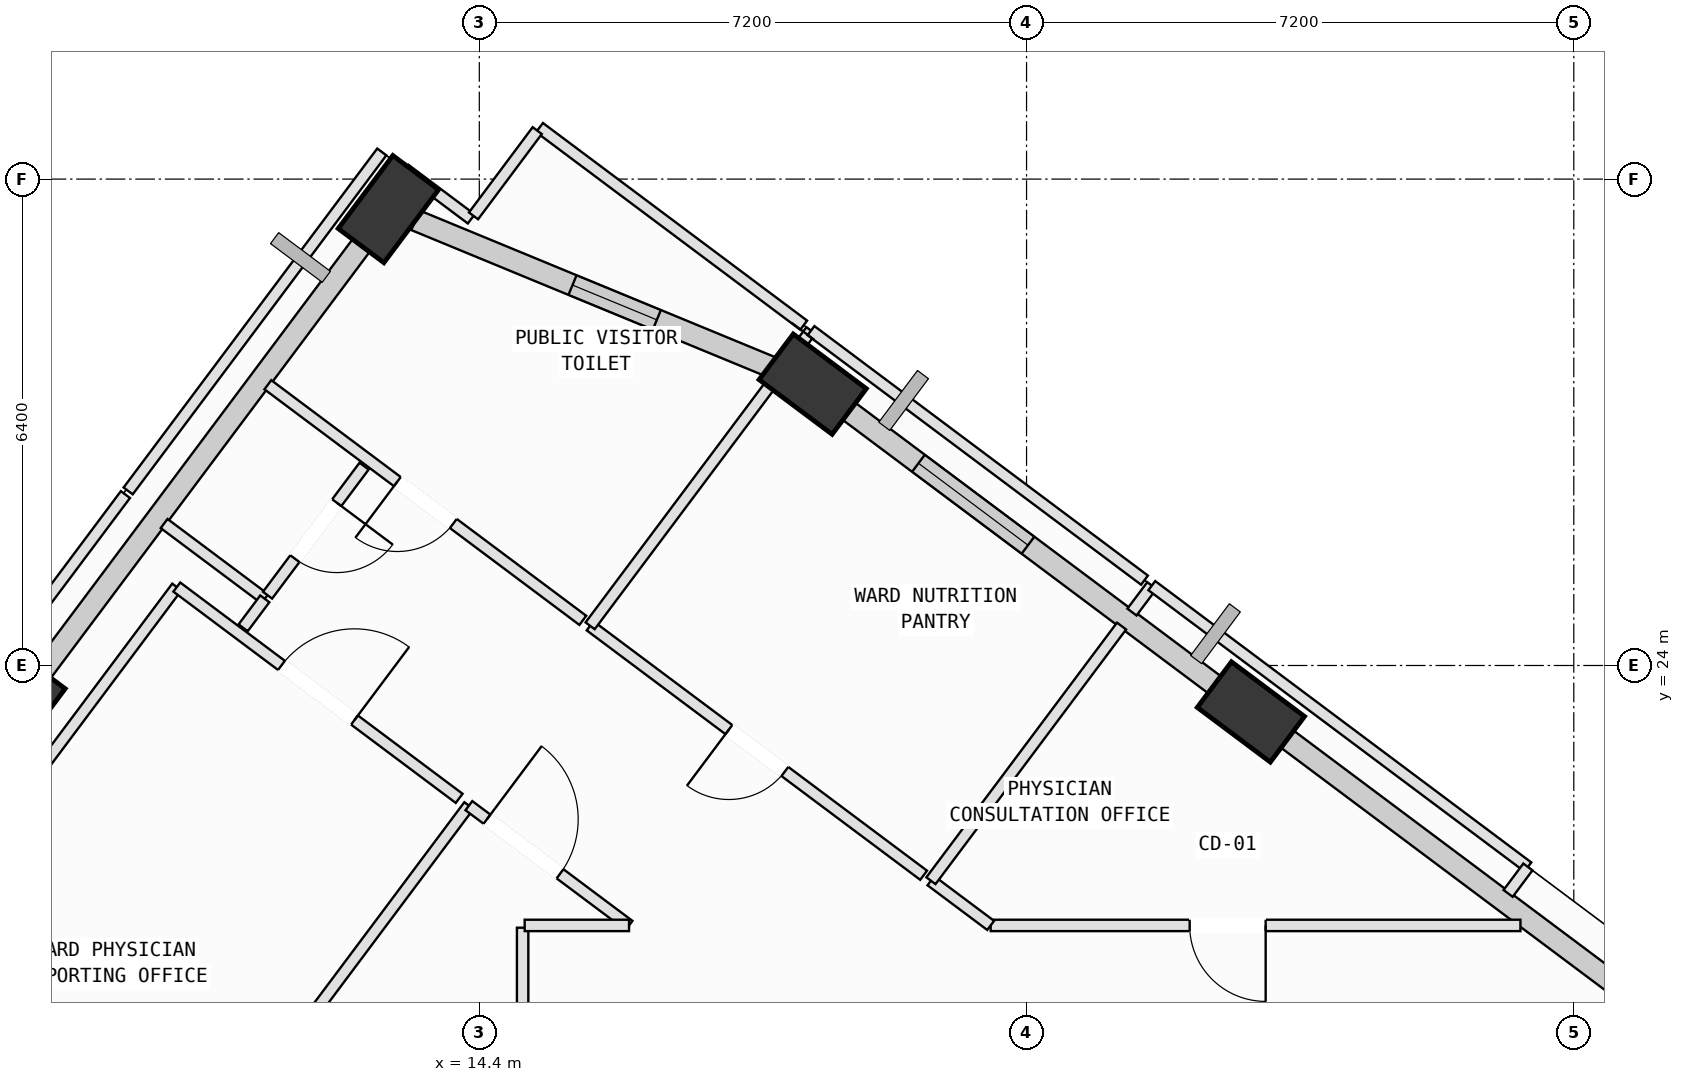
"""IFC4 building model, lengths in metres.
Left out: names, types, materials, properties, quantities, classifications, styles, units other than length and angle.
Written with IfcOpenShell. Run it as: python <this file> out.ifc"""

import sys

from ifc_helpers import new_model, si_unit, direction, frame, frame_2d, origin, origin_2d, place, context, subcontext, project, spatial, rectangle, extrude, element, fill, save


model = new_model("IFC4")
c1 = context("Model", 3, precision=1e-05, world=origin(), true_north=direction((0.0, 1.0)))
c2 = subcontext(c1, "Body", "Model", "MODEL_VIEW")
j1 = project(units=[si_unit("LENGTHUNIT", "METRE"), si_unit("PLANEANGLEUNIT", "RADIAN")], contexts=[c1])
p1 = place(None, origin())
s1 = spatial("IfcSite", under=j1, at=p1, CompositionType="ELEMENT")
p2 = place(p1, origin())
s2 = spatial("IfcBuilding", under=s1, at=p2, CompositionType="ELEMENT")
p3 = place(p2, frame((0.0, 0.0, 251.2)))
s3 = spatial("IfcBuildingStorey", under=s2, at=p3, CompositionType="ELEMENT", Elevation=251.2)
p4 = place(p3, frame((24.552, 23.389, 0.002), z_axis=(0.006165760518, -0.037421893045, 0.999280533843), x_axis=(-0.887393186709, 0.46045324072, 0.022718831231)))
e1 = element("IfcColumn", 1, at=p4, inside=s3, PredefinedType="COLUMN", context=c2, shape_type="SweptSolid", body=[
    extrude(rectangle(XDim=1.2, YDim=0.75, at=origin_2d()), origin(), (0.0, 0.0, 1.0), 3.999),
])
p5 = place(p3, frame((18.786, 27.702, 0.002), z_axis=(-0.011462699644, -0.061398609264, 0.998047502525), x_axis=(-0.677411868059, 0.734651823972, 0.037414683581)))
e2 = element("IfcColumn", 2, at=p5, inside=s3, PredefinedType="COLUMN", context=c2, shape_type="SweptSolid", body=[
    extrude(rectangle(XDim=1.2, YDim=0.75, at=origin_2d()), origin(), (0.0, 0.0, 1.0), 4.004),
])
p6 = place(p3, frame((13.204, 30.005, 0.002), z_axis=(-0.020814146338, -0.084352066736, 0.996218600584), x_axis=(0.772683823254, 0.630967378027, 0.069569225579)))
e3 = element("IfcColumn", 3, at=p6, inside=s3, PredefinedType="COLUMN", context=c2, shape_type="SweptSolid", body=[
    extrude(rectangle(XDim=1.2, YDim=0.75, at=origin_2d()), origin(), (0.0, 0.0, 1.0), 4.011),
])
p7 = place(p3, frame((8.292, 23.439, 0.002), z_axis=(0.006440188343, -0.104318899858, 0.994523047046), x_axis=(0.548815872699, 0.831743378243, 0.083690445228)))
e4 = element("IfcColumn", 4, at=p7, inside=s3, PredefinedType="COLUMN", context=c2, shape_type="SweptSolid", body=[
    extrude(rectangle(XDim=1.2, YDim=0.75, at=origin_2d()), origin(), (0.0, 0.0, 1.0), 4.018),
])
p8 = place(p3, frame((24.911, 23.12, 0.0), z_axis=(0.0, 0.0, 1.0), x_axis=(0.800736238288, -0.599017092154, 0.0)))
e5 = element("IfcWall", 5, at=p8, inside=s3, PredefinedType="SOLIDWALL", context=c2, shape_type="SweptSolid", body=[
    extrude(rectangle(XDim=6.958, YDim=0.28, at=frame_2d((3.479, 0.0))), origin(), (0.0, 0.0, 1.0), 3.165),
])
p9 = place(p3, frame((19.136, 27.44, 0.0), z_axis=(0.0, 0.0, 1.0), x_axis=(0.800738185677, -0.599014488972, 0.0)))
e6 = element("IfcWall", 6, at=p9, inside=s3, PredefinedType="SOLIDWALL", context=c2, shape_type="SweptSolid", body=[
    extrude(rectangle(XDim=6.424, YDim=0.28, at=frame_2d((3.212, 0.0))), origin(), (0.0, 0.0, 1.0), 3.265),
])
p10 = place(p9, frame((1.301, 0.0, 0.75)))
e7 = element("IfcOpeningElement", 7, at=p10, cuts=e6, PredefinedType="OPENING", context=c2, shape_type="SweptSolid", body=[
    extrude(rectangle(XDim=1.8, YDim=2.05, at=frame_2d((0.9, 1.025))), frame((0.0, 0.15, 0.0), z_axis=(0.0, -1.0, 0.0), x_axis=(1.0, 0.0, 0.0)), (0.0, 0.0, 1.0), 0.3),
])
p11 = place(p3, frame((13.559, 29.859, 0.0), z_axis=(0.0, 0.0, 1.0), x_axis=(0.924418513739, -0.381379615943, 0.0)))
e8 = element("IfcWall", 8, at=p11, inside=s3, PredefinedType="SOLIDWALL", context=c2, shape_type="SweptSolid", body=[
    extrude(rectangle(XDim=5.302, YDim=0.28, at=frame_2d((2.651, 0.0))), origin(), (0.0, 0.0, 1.0), 3.265),
])
p12 = place(p11, frame((2.237, 0.0, 0.75)))
e9 = element("IfcOpeningElement", 9, at=p12, cuts=e8, PredefinedType="OPENING", context=c2, shape_type="SweptSolid", body=[
    extrude(rectangle(XDim=1.2, YDim=1.75, at=frame_2d((0.6, 0.875))), frame((0.0, 0.15, 0.0), z_axis=(0.0, -1.0, 0.0), x_axis=(1.0, 0.0, 0.0)), (0.0, 0.0, 1.0), 0.3),
])
p13 = place(p3, frame((8.419, 23.61, 0.0), z_axis=(0.0, 0.0, 1.0), x_axis=(0.599043256436, 0.800716664569, 0.0)))
e10 = element("IfcWall", 10, at=p13, inside=s3, PredefinedType="SOLIDWALL", context=c2, shape_type="SweptSolid", body=[
    extrude(rectangle(XDim=7.434, YDim=0.28, at=frame_2d((3.717, 0.0))), origin(), (0.0, 0.0, 1.0), 3.265),
])
p14 = place(p3, frame((14.97, 20.55, 0.0), z_axis=(0.0, 0.0, 1.0), x_axis=(0.0, -1.0, 0.0)))
e11 = element("IfcWall", 11, at=p14, inside=s3, PredefinedType="PARTITIONING", context=c2, shape_type="SweptSolid", body=[
    extrude(rectangle(XDim=2.32, YDim=0.15, at=frame_2d((1.16, 0.0))), origin(), (0.0, 0.0, 1.0), 3.78),
])
p15 = place(p3, frame((6.096, 11.238, 0.0), z_axis=(0.0, 0.0, 1.0), x_axis=(0.598991058124, 0.80075571324, 0.0)))
e12 = element("IfcWall", 12, at=p15, inside=s3, PredefinedType="PARTITIONING", context=c2, shape_type="SweptSolid", body=[
    extrude(rectangle(XDim=13.635, YDim=0.15, at=frame_2d((6.817, 0.0))), origin(), (0.0, 0.0, 1.0), 3.78),
])
p16 = place(p3, frame((14.263, 22.156, 0.0), z_axis=(0.0, 0.0, 1.0), x_axis=(0.800812047069, -0.598915741377, 0.0)))
e13 = element("IfcWall", 13, at=p16, inside=s3, PredefinedType="PARTITIONING", context=c2, shape_type="SweptSolid", body=[
    extrude(rectangle(XDim=2.631, YDim=0.15, at=frame_2d((1.316, 0.0))), origin(), (0.0, 0.0, 1.0), 3.78),
])
p17 = place(p16, frame((0.297, 0.0, 0.0)))
e14 = element("IfcOpeningElement", 14, at=p17, cuts=e13, PredefinedType="OPENING", context=c2, shape_type="SweptSolid", body=[
    extrude(rectangle(XDim=1.2, YDim=2.15, at=frame_2d((0.6, 1.075))), frame((0.0, 0.085, 0.0), z_axis=(0.0, -1.0, 0.0), x_axis=(1.0, 0.0, 0.0)), (0.0, 0.0, 1.0), 0.17),
])
p18 = place(p3, frame((16.37, 20.58, 0.0), z_axis=(0.0, 0.0, 1.0), x_axis=(-1.0, 0.0, 0.0)))
e15 = element("IfcWall", 15, at=p18, inside=s3, PredefinedType="PARTITIONING", context=c2, shape_type="SweptSolid", body=[
    extrude(rectangle(XDim=1.373, YDim=0.15, at=frame_2d((0.687, 0.0))), origin(), (0.0, 0.0, 1.0), 3.78),
])
p19 = place(p3, frame((3.748, 16.112, 0.0), z_axis=(0.0, 0.0, 1.0), x_axis=(0.598961482062, 0.800777836235, 0.0)))
e16 = element("IfcWall", 16, at=p19, inside=s3, PredefinedType="PARTITIONING", context=c2, shape_type="SweptSolid", body=[
    extrude(rectangle(XDim=11.139, YDim=0.15, at=frame_2d((5.57, 0.0))), origin(), (0.0, 0.0, 1.0), 3.265),
])
p20 = place(p3, frame((10.42, 25.032, 0.0), z_axis=(0.0, 0.0, 1.0), x_axis=(0.800649857495, -0.599132544345, 0.0)))
e17 = element("IfcWall", 17, at=p20, inside=s3, PredefinedType="PARTITIONING", context=c2, shape_type="SweptSolid", body=[
    extrude(rectangle(XDim=4.64, YDim=0.15, at=frame_2d((2.32, 0.0))), origin(), (0.0, 0.0, 1.0), 3.78),
])
p21 = place(p20, frame((1.72, 0.0, 0.0)))
e18 = element("IfcOpeningElement", 18, at=p21, cuts=e17, PredefinedType="OPENING", context=c2, shape_type="SweptSolid", body=[
    extrude(rectangle(XDim=1.2, YDim=2.15, at=frame_2d((0.6, 1.075))), frame((0.0, 0.085, 0.0), z_axis=(0.0, -1.0, 0.0), x_axis=(1.0, 0.0, 0.0)), (0.0, 0.0, 1.0), 0.17),
])
p22 = place(p3, frame((28.098, 20.58, 0.0), z_axis=(0.0, 0.0, 1.0), x_axis=(-1.0, 0.0, 0.0)))
e19 = element("IfcWall", 19, at=p22, inside=s3, PredefinedType="PARTITIONING", context=c2, shape_type="SweptSolid", body=[
    extrude(rectangle(XDim=6.97, YDim=0.15, at=frame_2d((3.485, 0.0))), origin(), (0.0, 0.0, 1.0), 3.415),
])
p23 = place(p22, frame((3.352, 0.0, 0.0)))
e20 = element("IfcOpeningElement", 20, at=p23, cuts=e19, PredefinedType="OPENING", context=c2, shape_type="SweptSolid", body=[
    extrude(rectangle(XDim=1.0, YDim=2.12, at=frame_2d((0.5, 1.06))), frame((0.0, 0.085, 0.0), z_axis=(0.0, -1.0, 0.0), x_axis=(1.0, 0.0, 0.0)), (0.0, 0.0, 1.0), 0.17),
])
p24 = place(p3, frame((21.128, 20.58, 0.0), z_axis=(0.0, 0.0, 1.0), x_axis=(-0.800745649284, 0.599004511797, 0.0)))
e21 = element("IfcWall", 21, at=p24, inside=s3, PredefinedType="PARTITIONING", context=c2, shape_type="SweptSolid", body=[
    extrude(rectangle(XDim=0.981, YDim=0.15, at=frame_2d((0.491, 0.0))), origin(), (0.0, 0.0, 1.0), 3.415),
])
p25 = place(p3, frame((20.342, 21.168, 0.0), z_axis=(0.0, 0.0, 1.0), x_axis=(0.599197113392, 0.800601535911, 0.0)))
e22 = element("IfcWall", 22, at=p25, inside=s3, PredefinedType="PARTITIONING", context=c2, shape_type="SweptSolid", body=[
    extrude(rectangle(XDim=4.186, YDim=0.15, at=frame_2d((2.093, 0.0))), origin(), (0.0, 0.0, 1.0), 3.78),
])
p26 = place(p3, frame((22.987, 24.703, 0.0), z_axis=(0.0, 0.0, 1.0), x_axis=(0.599820431531, 0.800134644868, 0.0)))
e23 = element("IfcWall", 23, at=p26, inside=s3, PredefinedType="PARTITIONING", context=c2, shape_type="SweptSolid", body=[
    extrude(rectangle(XDim=0.435, YDim=0.15, at=frame_2d((0.218, 0.0))), origin(), (0.0, 0.0, 1.0), 3.78),
])
p27 = place(p3, frame((23.248, 25.051, 0.0), z_axis=(0.0, 0.0, 1.0), x_axis=(0.800705846132, -0.599057716727, 0.0)))
e24 = element("IfcWall", 24, at=p27, inside=s3, PredefinedType="PARTITIONING", context=c2, shape_type="SweptSolid", body=[
    extrude(rectangle(XDim=6.179, YDim=0.15, at=frame_2d((3.09, 0.0))), origin(), (0.0, 0.0, 1.0), 3.78),
])
p28 = place(p3, frame((28.196, 21.349, 0.0), z_axis=(0.0, 0.0, 1.0), x_axis=(-0.598380616577, -0.801211980505, 0.0)))
e25 = element("IfcWall", 25, at=p28, inside=s3, PredefinedType="PARTITIONING", context=c2, shape_type="SweptSolid", body=[
    extrude(rectangle(XDim=0.435, YDim=0.15, at=frame_2d((0.217, 0.0))), origin(), (0.0, 0.0, 1.0), 3.78),
])
p29 = place(p3, frame((20.246, 21.24, 0.0), z_axis=(0.0, 0.0, 1.0), x_axis=(-0.800801245032, 0.598930184542, 0.0)))
e26 = element("IfcWall", 26, at=p29, inside=s3, PredefinedType="PARTITIONING", context=c2, shape_type="SweptSolid", body=[
    extrude(rectangle(XDim=5.48, YDim=0.15, at=frame_2d((2.74, 0.0))), origin(), (0.0, 0.0, 1.0), 3.415),
])
p30 = place(p29, frame((2.28, 0.0, 0.0)))
e27 = element("IfcOpeningElement", 27, at=p30, cuts=e26, PredefinedType="OPENING", context=c2, shape_type="SweptSolid", body=[
    extrude(rectangle(XDim=0.92, YDim=2.1, at=frame_2d((0.46, 1.05))), frame((0.0, 0.085, 0.0), z_axis=(0.0, -1.0, 0.0), x_axis=(1.0, 0.0, 0.0)), (0.0, 0.0, 1.0), 0.17),
])
p31 = place(p3, frame((15.858, 24.522, 0.0), z_axis=(0.0, 0.0, 1.0), x_axis=(0.599126091741, 0.800654685989, 0.0)))
e28 = element("IfcWall", 28, at=p31, inside=s3, PredefinedType="PARTITIONING", context=c2, shape_type="SweptSolid", body=[
    extrude(rectangle(XDim=4.069, YDim=0.15, at=frame_2d((2.035, 0.0))), origin(), (0.0, 0.0, 1.0), 3.78),
])
p32 = place(p3, frame((18.438, 27.97, 0.0), z_axis=(0.0, 0.0, 1.0), x_axis=(0.598707624048, 0.800967652847, 0.0)))
e29 = element("IfcWall", 29, at=p32, inside=s3, PredefinedType="PARTITIONING", context=c2, shape_type="SweptSolid", body=[
    extrude(rectangle(XDim=0.544, YDim=0.15, at=frame_2d((0.272, 0.0))), origin(), (0.0, 0.0, 1.0), 3.78),
])
p33 = place(p3, frame((18.764, 28.406, 0.0), z_axis=(0.0, 0.0, 1.0), x_axis=(0.800715770643, -0.599044451309, 0.0)))
e30 = element("IfcWall", 30, at=p33, inside=s3, PredefinedType="PARTITIONING", context=c2, shape_type="SweptSolid", body=[
    extrude(rectangle(XDim=5.48, YDim=0.15, at=frame_2d((2.74, 0.0))), origin(), (0.0, 0.0, 1.0), 3.78),
])
p34 = place(p3, frame((15.192, 31.078, 0.0), z_axis=(0.0, 0.0, 1.0), x_axis=(0.800795703966, -0.598937593168, 0.0)))
e31 = element("IfcWall", 31, at=p34, inside=s3, PredefinedType="PARTITIONING", context=c2, shape_type="SweptSolid", body=[
    extrude(rectangle(XDim=4.341, YDim=0.15, at=frame_2d((2.17, 0.0))), origin(), (0.0, 0.0, 1.0), 3.78),
])
p35 = place(p3, frame((15.762, 24.594, 0.0), z_axis=(0.0, 0.0, 1.0), x_axis=(-0.800735316179, 0.599018324781, 0.0)))
e32 = element("IfcWall", 32, at=p35, inside=s3, PredefinedType="PARTITIONING", context=c2, shape_type="SweptSolid", body=[
    extrude(rectangle(XDim=5.175, YDim=0.15, at=frame_2d((2.588, 0.0))), origin(), (0.0, 0.0, 1.0), 3.78),
])
p36 = place(p35, frame((2.128, 0.0, 0.0)))
e33 = element("IfcOpeningElement", 33, at=p36, cuts=e32, PredefinedType="OPENING", context=c2, shape_type="SweptSolid", body=[
    extrude(rectangle(XDim=0.92, YDim=2.1, at=frame_2d((0.46, 1.05))), frame((0.0, 0.085, 0.0), z_axis=(0.0, -1.0, 0.0), x_axis=(1.0, 0.0, 0.0)), (0.0, 0.0, 1.0), 0.17),
])
p37 = place(p3, frame((12.721, 29.677, 0.0), z_axis=(0.0, 0.0, 1.0), x_axis=(0.599184230466, 0.800611177764, 0.0)))
e34 = element("IfcWall", 34, at=p37, inside=s3, PredefinedType="PARTITIONING", context=c2, shape_type="SweptSolid", body=[
    extrude(rectangle(XDim=1.102, YDim=0.15, at=frame_2d((0.551, 0.0))), origin(), (0.0, 0.0, 1.0), 3.265),
])
p38 = place(p3, frame((13.421, 30.529, 0.0), z_axis=(0.0, 0.0, 1.0), x_axis=(0.800751755219, -0.598996349332, 0.0)))
e35 = element("IfcWall", 35, at=p38, inside=s3, PredefinedType="PARTITIONING", context=c2, shape_type="SweptSolid", body=[
    extrude(rectangle(XDim=1.09, YDim=0.15, at=frame_2d((0.545, 0.0))), origin(), (0.0, 0.0, 1.0), 3.78),
])
p39 = place(p3, frame((14.324, 29.916, 0.0), z_axis=(0.0, 0.0, 1.0), x_axis=(0.598436958671, 0.801169898646, 0.0)))
e36 = element("IfcWall", 36, at=p39, inside=s3, PredefinedType="PARTITIONING", context=c2, shape_type="SweptSolid", body=[
    extrude(rectangle(XDim=1.401, YDim=0.15, at=frame_2d((0.7, 0.0))), origin(), (0.0, 0.0, 1.0), 3.78),
])
p40 = place(p3, frame((6.306, 21.653, 0.0), z_axis=(0.0, 0.0, 1.0), x_axis=(0.598999072207, 0.800749718386, 0.0)))
e37 = element("IfcWall", 37, at=p40, inside=s3, PredefinedType="PARTITIONING", context=c2, shape_type="SweptSolid", body=[
    extrude(rectangle(XDim=5.74, YDim=0.15, at=frame_2d((2.87, 0.0))), origin(), (0.0, 0.0, 1.0), 3.78),
])
p41 = place(p3, frame((10.253, 25.868, 0.0), z_axis=(0.0, 0.0, 1.0), x_axis=(0.800796106591, -0.598937054847, 0.0)))
e38 = element("IfcWall", 38, at=p41, inside=s3, PredefinedType="PARTITIONING", context=c2, shape_type="SweptSolid", body=[
    extrude(rectangle(XDim=1.655, YDim=0.15, at=frame_2d((0.827, 0.0))), origin(), (0.0, 0.0, 1.0), 3.78),
])
p42 = place(p3, frame((11.578, 24.877, 0.0), z_axis=(0.0, 0.0, 1.0), x_axis=(-0.59901402037, -0.800738536228, 0.0)))
e39 = element("IfcWall", 39, at=p42, inside=s3, PredefinedType="PARTITIONING", context=c2, shape_type="SweptSolid", body=[
    extrude(rectangle(XDim=0.476, YDim=0.15, at=frame_2d((0.238, 0.0))), origin(), (0.0, 0.0, 1.0), 3.78),
])
p43 = place(p3, frame((12.884, 26.623, 0.0), z_axis=(0.0, 0.0, 1.0), x_axis=(-0.598949421872, -0.800786856809, 0.0)))
e40 = element("IfcWall", 40, at=p43, inside=s3, PredefinedType="PARTITIONING", context=c2, shape_type="SweptSolid", body=[
    extrude(rectangle(XDim=2.12, YDim=0.15, at=frame_2d((1.06, 0.0))), origin(), (0.0, 0.0, 1.0), 3.78),
])
p44 = place(p43, frame((0.6, 0.0, 0.0)))
e41 = element("IfcOpeningElement", 41, at=p44, cuts=e40, PredefinedType="OPENING", context=c2, shape_type="SweptSolid", body=[
    extrude(rectangle(XDim=0.92, YDim=2.1, at=frame_2d((0.46, 1.05))), frame((0.0, 0.085, 0.0), z_axis=(0.0, -1.0, 0.0), x_axis=(1.0, 0.0, 0.0)), (0.0, 0.0, 1.0), 0.17),
])
p45 = place(p3, frame((9.78, 26.297, 0.0), z_axis=(0.0, 0.0, 1.0), x_axis=(0.599073900283, 0.800693737955, 0.0)))
e42 = element("IfcWall", 42, at=p45, inside=s3, PredefinedType="PARTITIONING", context=c2, shape_type="SweptSolid", body=[
    extrude(rectangle(XDim=5.57, YDim=0.15, at=frame_2d((2.785, 0.0))), origin(), (0.0, 0.0, 1.0), 3.78),
])
p46 = place(p10, origin())
e43 = element("IfcWindow", 43, at=p46, inside=s3, PartitioningType="SINGLE_PANEL", PredefinedType="WINDOW", context=c2, shape_type="SweptSolid", body=[
    extrude(rectangle(XDim=1.8, YDim=2.05, at=frame_2d((0.9, 1.025))), frame((0.0, 0.03, 0.0), z_axis=(0.0, -1.0, 0.0), x_axis=(1.0, 0.0, 0.0)), (0.0, 0.0, 1.0), 0.06),
])
fill(e7, e43)
p47 = place(p12, origin())
e44 = element("IfcWindow", 44, at=p47, inside=s3, PartitioningType="SINGLE_PANEL", PredefinedType="WINDOW", context=c2, shape_type="SweptSolid", body=[
    extrude(rectangle(XDim=1.2, YDim=1.75, at=frame_2d((0.6, 0.875))), frame((0.0, 0.03, 0.0), z_axis=(0.0, -1.0, 0.0), x_axis=(1.0, 0.0, 0.0)), (0.0, 0.0, 1.0), 0.06),
])
fill(e9, e44)
p48 = place(p17, origin())
e45 = element("IfcDoor", 45, at=p48, inside=s3, OperationType="SINGLE_SWING_LEFT", PredefinedType="DOOR", context=c2, shape_type="SweptSolid", body=[
    extrude(rectangle(XDim=1.2, YDim=2.15, at=frame_2d((0.6, 1.075))), frame((0.0, 0.025, 0.0), z_axis=(0.0, -1.0, 0.0), x_axis=(1.0, 0.0, 0.0)), (0.0, 0.0, 1.0), 0.05),
])
fill(e14, e45)
p49 = place(p21, origin())
e46 = element("IfcDoor", 46, at=p49, inside=s3, OperationType="SINGLE_SWING_RIGHT", PredefinedType="DOOR", context=c2, shape_type="SweptSolid", body=[
    extrude(rectangle(XDim=1.2, YDim=2.15, at=frame_2d((0.6, 1.075))), frame((0.0, 0.025, 0.0), z_axis=(0.0, -1.0, 0.0), x_axis=(1.0, 0.0, 0.0)), (0.0, 0.0, 1.0), 0.05),
])
fill(e18, e46)
p50 = place(p23, origin())
e47 = element("IfcDoor", 47, at=p50, inside=s3, OperationType="SINGLE_SWING_LEFT", PredefinedType="DOOR", context=c2, shape_type="SweptSolid", body=[
    extrude(rectangle(XDim=1.0, YDim=2.12, at=frame_2d((0.5, 1.06))), frame((0.0, 0.025, 0.0), z_axis=(0.0, -1.0, 0.0), x_axis=(1.0, 0.0, 0.0)), (0.0, 0.0, 1.0), 0.05),
])
fill(e20, e47)
p51 = place(p30, origin())
e48 = element("IfcDoor", 48, at=p51, inside=s3, OperationType="SINGLE_SWING_RIGHT", PredefinedType="DOOR", context=c2, shape_type="SweptSolid", body=[
    extrude(rectangle(XDim=0.92, YDim=2.1, at=frame_2d((0.46, 1.05))), frame((0.0, 0.025, 0.0), z_axis=(0.0, -1.0, 0.0), x_axis=(1.0, 0.0, 0.0)), (0.0, 0.0, 1.0), 0.05),
])
fill(e27, e48)
p52 = place(p36, origin())
e49 = element("IfcDoor", 49, at=p52, inside=s3, OperationType="SINGLE_SWING_RIGHT", PredefinedType="DOOR", context=c2, shape_type="SweptSolid", body=[
    extrude(rectangle(XDim=0.92, YDim=2.1, at=frame_2d((0.46, 1.05))), frame((0.0, 0.025, 0.0), z_axis=(0.0, -1.0, 0.0), x_axis=(1.0, 0.0, 0.0)), (0.0, 0.0, 1.0), 0.05),
])
fill(e33, e49)
p53 = place(p44, origin())
e50 = element("IfcDoor", 50, at=p53, inside=s3, OperationType="SINGLE_SWING_LEFT", PredefinedType="DOOR", context=c2, shape_type="SweptSolid", body=[
    extrude(rectangle(XDim=0.92, YDim=2.1, at=frame_2d((0.46, 1.05))), frame((0.0, 0.025, 0.0), z_axis=(0.0, -1.0, 0.0), x_axis=(1.0, 0.0, 0.0)), (0.0, 0.0, 1.0), 0.05),
])
fill(e41, e50)
save(model, sys.argv[1])
